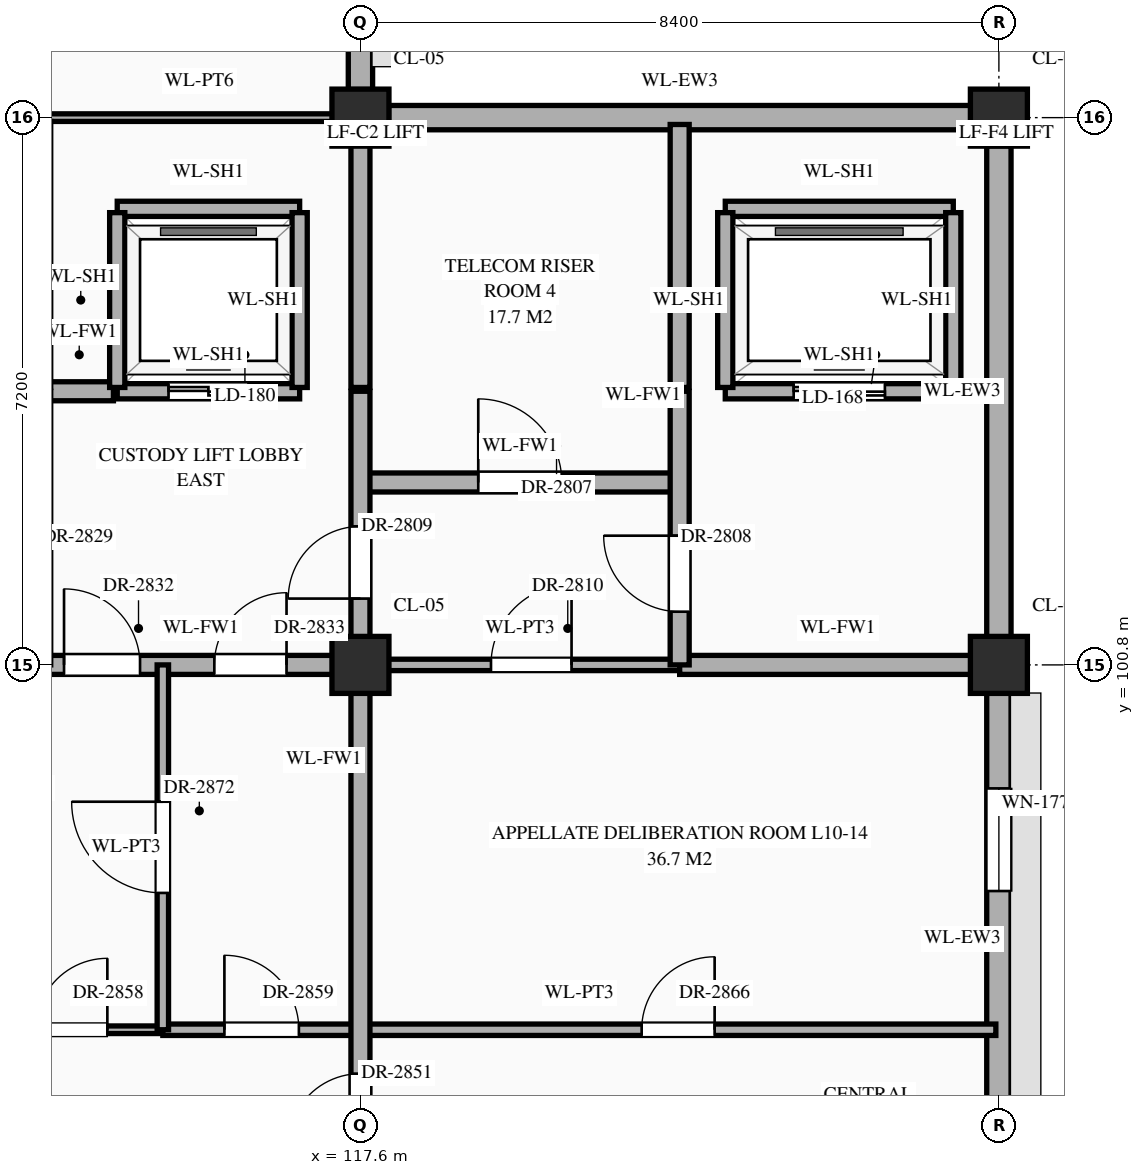
"""IFC4 building model, lengths in metres.
Left out: names, types, materials, properties, quantities, classifications, styles, units other than length and angle.
Written with IfcOpenShell. Run it as: python <this file> out.ifc"""

import sys

from ifc_helpers import new_model, si_unit, direction, frame, frame_2d, origin, origin_2d, place, context, subcontext, project, spatial, rectangle, extrude, element, fill, save


model = new_model("IFC4")
c1 = context("Model", 3, precision=1e-05, world=origin(), true_north=direction((0.0, 1.0)))
c2 = subcontext(c1, "Body", "Model", "MODEL_VIEW")
j1 = project(units=[si_unit("LENGTHUNIT", "METRE"), si_unit("PLANEANGLEUNIT", "RADIAN")], contexts=[c1])
p1 = place(None, origin())
s1 = spatial("IfcSite", under=j1, at=p1, CompositionType="ELEMENT")
p2 = place(p1, origin())
s2 = spatial("IfcBuilding", under=s1, at=p2, CompositionType="ELEMENT")
p3 = place(p2, frame((0.0, 0.0, 43.5)))
s3 = spatial("IfcBuildingStorey", under=s2, at=p3, CompositionType="ELEMENT", Elevation=43.5)
for number, where, z_axis, x_axis in (
    (1, (117.6, 100.8, 0.0), (0.0, 0.0, 1.0), (1.0, 0.0, 0.0)),
    (2, (117.6, 108.0, 0.0), (0.0, 0.0, 1.0), (1.0, 0.0, 0.0)),
    (3, (126.0, 100.8, 0.0), (0.0, 0.0, 1.0), (1.0, 0.0, 0.0)),
    (4, (126.0, 108.0, 0.0), (0.0, 0.0, 1.0), (1.0, 0.0, 0.0)),
):
    element("IfcColumn", number, at=place(p3, frame(where, z_axis=z_axis, x_axis=x_axis)), inside=s3, PredefinedType="COLUMN", context=c2, shape_type="SweptSolid", body=[
        extrude(rectangle(XDim=0.75, YDim=0.75, at=origin_2d()), origin(), (0.0, 0.0, 1.0), 4.2),
    ])
p4 = place(p3, frame((117.6, 108.37, 0.0), z_axis=(0.0, 0.0, 1.0), x_axis=(0.0, 1.0, 0.0)))
e5 = element("IfcWall", 5, at=p4, inside=s3, PredefinedType="STANDARD", context=c2, shape_type="SweptSolid", body=[
    extrude(rectangle(XDim=6.46, YDim=0.32, at=frame_2d((3.23, 0.0))), origin(), (0.0, 0.0, 1.0), 3.35),
])
p5 = place(p4, frame((3.855, 0.0, 0.85)))
e6 = element("IfcOpeningElement", 6, at=p5, cuts=e5, PredefinedType="OPENING", context=c2, shape_type="SweptSolid", body=[
    extrude(rectangle(XDim=1.35, YDim=1.38, at=frame_2d((0.675, 0.69))), frame((0.0, 0.172, 0.0), z_axis=(0.0, -1.0, 0.0), x_axis=(1.0, 0.0, 0.0)), (0.0, 0.0, 1.0), 0.344),
])
p6 = place(p3, frame((126.0, 93.97, 0.0), z_axis=(0.0, 0.0, 1.0), x_axis=(0.0, 1.0, 0.0)))
e7 = element("IfcWall", 7, at=p6, inside=s3, PredefinedType="STANDARD", context=c2, shape_type="SweptSolid", body=[
    extrude(rectangle(XDim=6.46, YDim=0.32, at=frame_2d((3.23, 0.0))), origin(), (0.0, 0.0, 1.0), 3.35),
])
p7 = place(p6, frame((3.855, 0.0, 0.85)))
e8 = element("IfcOpeningElement", 8, at=p7, cuts=e7, PredefinedType="OPENING", context=c2, shape_type="SweptSolid", body=[
    extrude(rectangle(XDim=1.35, YDim=1.2, at=frame_2d((0.675, 0.6))), frame((0.0, 0.172, 0.0), z_axis=(0.0, -1.0, 0.0), x_axis=(1.0, 0.0, 0.0)), (0.0, 0.0, 1.0), 0.344),
])
p8 = place(p3, frame((117.97, 108.0, 0.0), z_axis=(0.0, 0.0, 1.0), x_axis=(1.0, 0.0, 0.0)))
e9 = element("IfcWall", 9, at=p8, inside=s3, PredefinedType="STANDARD", context=c2, shape_type="SweptSolid", body=[
    extrude(rectangle(XDim=7.66, YDim=0.32, at=frame_2d((3.83, 0.0))), origin(), (0.0, 0.0, 1.0), 3.35),
])
p9 = place(p3, frame((126.0, 101.17, 0.0), z_axis=(0.0, 0.0, 1.0), x_axis=(0.0, 1.0, 0.0)))
e10 = element("IfcWall", 10, at=p9, inside=s3, PredefinedType="STANDARD", context=c2, shape_type="SweptSolid", body=[
    extrude(rectangle(XDim=6.46, YDim=0.32, at=frame_2d((3.23, 0.0))), origin(), (0.0, 0.0, 1.0), 3.35),
])
p10 = place(p3, frame((109.2, 96.0, 0.0), z_axis=(0.0, 0.0, 1.0), x_axis=(1.0, 0.0, 0.0)))
e11 = element("IfcWall", 11, at=p10, inside=s3, PredefinedType="STANDARD", context=c2, shape_type="SweptSolid", body=[
    extrude(rectangle(XDim=5.8, YDim=0.1, at=frame_2d((2.9, 0.0))), origin(), (0.0, 0.0, 1.0), 3.95),
])
p11 = place(p10, frame((1.06, 0.0, 0.0)))
e12 = element("IfcOpeningElement", 12, at=p11, cuts=e11, PredefinedType="OPENING", context=c2, shape_type="SweptSolid", body=[
    extrude(rectangle(XDim=1.28, YDim=2.35, at=frame_2d((0.64, 1.175))), frame((0.0, 0.062, 0.0), z_axis=(0.0, -1.0, 0.0), x_axis=(1.0, 0.0, 0.0)), (0.0, 0.0, 1.0), 0.124),
])
p12 = place(p10, frame((4.13, 0.0, 0.0)))
e13 = element("IfcOpeningElement", 13, at=p12, cuts=e11, PredefinedType="OPENING", context=c2, shape_type="SweptSolid", body=[
    extrude(rectangle(XDim=0.94, YDim=2.3, at=frame_2d((0.47, 1.15))), frame((0.0, 0.062, 0.0), z_axis=(0.0, -1.0, 0.0), x_axis=(1.0, 0.0, 0.0)), (0.0, 0.0, 1.0), 0.124),
])
p13 = place(p3, frame((115.0, 96.0, 0.0), z_axis=(0.0, 0.0, 1.0), x_axis=(1.0, 0.0, 0.0)))
e14 = element("IfcWall", 14, at=p13, inside=s3, PredefinedType="STANDARD", context=c2, shape_type="SweptSolid", body=[
    extrude(rectangle(XDim=10.96, YDim=0.15, at=frame_2d((5.48, 0.0))), origin(), (0.0, 0.0, 1.0), 4.0),
])
p14 = place(p13, frame((0.81, 0.0, 0.0)))
e15 = element("IfcOpeningElement", 15, at=p14, cuts=e14, PredefinedType="OPENING", context=c2, shape_type="SweptSolid", body=[
    extrude(rectangle(XDim=0.98, YDim=2.35, at=frame_2d((0.49, 1.175))), frame((0.0, 0.087, 0.0), z_axis=(0.0, -1.0, 0.0), x_axis=(1.0, 0.0, 0.0)), (0.0, 0.0, 1.0), 0.174),
])
p15 = place(p13, frame((6.3, 0.0, 0.0)))
e16 = element("IfcOpeningElement", 16, at=p15, cuts=e14, PredefinedType="OPENING", context=c2, shape_type="SweptSolid", body=[
    extrude(rectangle(XDim=0.96, YDim=2.2, at=frame_2d((0.48, 1.1))), frame((0.0, 0.087, 0.0), z_axis=(0.0, -1.0, 0.0), x_axis=(1.0, 0.0, 0.0)), (0.0, 0.0, 1.0), 0.174),
])
p16 = place(p3, frame((113.4, 100.8, 0.0), z_axis=(0.0, 0.0, 1.0), x_axis=(1.0, 0.0, 0.0)))
e17 = element("IfcWall", 17, at=p16, inside=s3, PredefinedType="STANDARD", context=c2, shape_type="SweptSolid", body=[
    extrude(rectangle(XDim=4.2, YDim=0.25, at=frame_2d((2.1, 0.0))), origin(), (0.0, 0.0, 1.0), 3.1),
])
p17 = place(p16, frame((0.3, 0.0, 0.0)))
e18 = element("IfcOpeningElement", 18, at=p17, cuts=e17, PredefinedType="OPENING", context=c2, shape_type="SweptSolid", body=[
    extrude(rectangle(XDim=1.0, YDim=2.2, at=frame_2d((0.5, 1.1))), frame((0.0, 0.137, 0.0), z_axis=(0.0, -1.0, 0.0), x_axis=(1.0, 0.0, 0.0)), (0.0, 0.0, 1.0), 0.274),
])
p18 = place(p16, frame((2.278, 0.0, 0.0)))
e19 = element("IfcOpeningElement", 19, at=p18, cuts=e17, PredefinedType="OPENING", context=c2, shape_type="SweptSolid", body=[
    extrude(rectangle(XDim=0.95, YDim=2.15, at=frame_2d((0.475, 1.075))), frame((0.0, 0.137, 0.0), z_axis=(0.0, -1.0, 0.0), x_axis=(1.0, 0.0, 0.0)), (0.0, 0.0, 1.0), 0.274),
])
p19 = place(p3, frame((117.6, 100.8, 0.0), z_axis=(0.0, 0.0, 1.0), x_axis=(1.0, 0.0, 0.0)))
e20 = element("IfcWall", 20, at=p19, inside=s3, PredefinedType="STANDARD", context=c2, shape_type="SweptSolid", body=[
    extrude(rectangle(XDim=4.2, YDim=0.15, at=frame_2d((2.1, 0.0))), origin(), (0.0, 0.0, 1.0), 3.15),
])
p20 = place(p19, frame((1.718, 0.0, 0.0)))
e21 = element("IfcOpeningElement", 21, at=p20, cuts=e20, PredefinedType="OPENING", context=c2, shape_type="SweptSolid", body=[
    extrude(rectangle(XDim=1.06, YDim=2.4, at=frame_2d((0.53, 1.2))), frame((0.0, 0.087, 0.0), z_axis=(0.0, -1.0, 0.0), x_axis=(1.0, 0.0, 0.0)), (0.0, 0.0, 1.0), 0.174),
])
p21 = place(p3, frame((121.8, 100.8, 0.0), z_axis=(0.0, 0.0, 1.0), x_axis=(1.0, 0.0, 0.0)))
e22 = element("IfcWall", 22, at=p21, inside=s3, PredefinedType="STANDARD", context=c2, shape_type="SweptSolid", body=[
    extrude(rectangle(XDim=4.16, YDim=0.25, at=frame_2d((2.08, 0.0))), origin(), (0.0, 0.0, 1.0), 3.15),
])
p22 = place(p3, frame((117.6, 103.2, 0.0), z_axis=(0.0, 0.0, 1.0), x_axis=(1.0, 0.0, 0.0)))
e23 = element("IfcWall", 23, at=p22, inside=s3, PredefinedType="STANDARD", context=c2, shape_type="SweptSolid", body=[
    extrude(rectangle(XDim=4.2, YDim=0.25, at=frame_2d((2.1, 0.0))), origin(), (0.0, 0.0, 1.0), 4.0),
])
p23 = place(p22, frame((1.55, 0.0, 0.0)))
e24 = element("IfcOpeningElement", 24, at=p23, cuts=e23, PredefinedType="OPENING", context=c2, shape_type="SweptSolid", body=[
    extrude(rectangle(XDim=1.1, YDim=2.2, at=frame_2d((0.55, 1.1))), frame((0.0, 0.137, 0.0), z_axis=(0.0, -1.0, 0.0), x_axis=(1.0, 0.0, 0.0)), (0.0, 0.0, 1.0), 0.274),
])
p24 = place(p3, frame((113.45, 104.4, 0.0), z_axis=(0.0, 0.0, 1.0), x_axis=(1.0, 0.0, 0.0)))
e25 = element("IfcWall", 25, at=p24, inside=s3, PredefinedType="STANDARD", context=c2, shape_type="SweptSolid", body=[
    extrude(rectangle(XDim=0.9, YDim=0.25, at=frame_2d((0.45, 0.0))), origin(), (0.0, 0.0, 1.0), 3.95),
])
p25 = place(p3, frame((114.4, 104.4, 0.0), z_axis=(0.0, 0.0, 1.0), x_axis=(1.0, 0.0, 0.0)))
e26 = element("IfcWall", 26, at=p25, inside=s3, PredefinedType="STANDARD", context=c2, shape_type="SweptSolid", body=[
    extrude(rectangle(XDim=2.4, YDim=0.2, at=frame_2d((1.2, 0.0))), origin(), (0.0, 0.0, 1.0), 3.95),
])
p26 = place(p25, frame((0.675, 0.0, 0.0)))
e27 = element("IfcOpeningElement", 27, at=p26, cuts=e26, PredefinedType="OPENING", context=c2, shape_type="SweptSolid", body=[
    extrude(rectangle(XDim=1.05, YDim=2.15, at=frame_2d((0.525, 1.075))), frame((0.0, 0.112, 0.0), z_axis=(0.0, -1.0, 0.0), x_axis=(1.0, 0.0, 0.0)), (0.0, 0.0, 1.0), 0.224),
])
p27 = place(p3, frame((122.4, 104.4, 0.0), z_axis=(0.0, 0.0, 1.0), x_axis=(1.0, 0.0, 0.0)))
e28 = element("IfcWall", 28, at=p27, inside=s3, PredefinedType="STANDARD", context=c2, shape_type="SweptSolid", body=[
    extrude(rectangle(XDim=3.0, YDim=0.2, at=frame_2d((1.5, 0.0))), origin(), (0.0, 0.0, 1.0), 4.0),
])
p28 = place(p27, frame((0.9, 0.0, 0.0)))
e29 = element("IfcOpeningElement", 29, at=p28, cuts=e28, PredefinedType="OPENING", context=c2, shape_type="SweptSolid", body=[
    extrude(rectangle(XDim=1.2, YDim=2.15, at=frame_2d((0.6, 1.075))), frame((0.0, 0.112, 0.0), z_axis=(0.0, -1.0, 0.0), x_axis=(1.0, 0.0, 0.0)), (0.0, 0.0, 1.0), 0.224),
])
p29 = place(p3, frame((114.4, 106.8, 0.0), z_axis=(0.0, 0.0, 1.0), x_axis=(1.0, 0.0, 0.0)))
e30 = element("IfcWall", 30, at=p29, inside=s3, PredefinedType="STANDARD", context=c2, shape_type="SweptSolid", body=[
    extrude(rectangle(XDim=2.4, YDim=0.2, at=frame_2d((1.2, 0.0))), origin(), (0.0, 0.0, 1.0), 3.95),
])
p30 = place(p3, frame((122.4, 106.8, 0.0), z_axis=(0.0, 0.0, 1.0), x_axis=(1.0, 0.0, 0.0)))
e31 = element("IfcWall", 31, at=p30, inside=s3, PredefinedType="STANDARD", context=c2, shape_type="SweptSolid", body=[
    extrude(rectangle(XDim=3.0, YDim=0.2, at=frame_2d((1.5, 0.0))), origin(), (0.0, 0.0, 1.0), 4.0),
])
p31 = place(p3, frame((113.45, 108.0, 0.0), z_axis=(0.0, 0.0, 1.0), x_axis=(1.0, 0.0, 0.0)))
e32 = element("IfcWall", 32, at=p31, inside=s3, PredefinedType="STANDARD", context=c2, shape_type="SweptSolid", body=[
    extrude(rectangle(XDim=4.06, YDim=0.1, at=frame_2d((2.03, 0.0))), origin(), (0.0, 0.0, 1.0), 3.1),
])
p32 = place(p3, frame((114.4, 104.45, 0.0), z_axis=(0.0, 0.0, 1.0), x_axis=(0.0, 1.0, 0.0)))
e33 = element("IfcWall", 33, at=p32, inside=s3, PredefinedType="STANDARD", context=c2, shape_type="SweptSolid", body=[
    extrude(rectangle(XDim=2.3, YDim=0.2, at=frame_2d((1.15, 0.0))), origin(), (0.0, 0.0, 1.0), 3.95),
])
p33 = place(p3, frame((115.0, 96.0, 0.0), z_axis=(0.0, 0.0, 1.0), x_axis=(0.0, 1.0, 0.0)))
e34 = element("IfcWall", 34, at=p33, inside=s3, PredefinedType="STANDARD", context=c2, shape_type="SweptSolid", body=[
    extrude(rectangle(XDim=4.8, YDim=0.15, at=frame_2d((2.4, 0.0))), origin(), (0.0, 0.0, 1.0), 3.95),
])
p34 = place(p33, frame((1.8, 0.0, 0.0)))
e35 = element("IfcOpeningElement", 35, at=p34, cuts=e34, PredefinedType="OPENING", context=c2, shape_type="SweptSolid", body=[
    extrude(rectangle(XDim=1.2, YDim=2.35, at=frame_2d((0.6, 1.175))), frame((0.0, 0.087, 0.0), z_axis=(0.0, -1.0, 0.0), x_axis=(1.0, 0.0, 0.0)), (0.0, 0.0, 1.0), 0.174),
])
p35 = place(p3, frame((116.8, 104.45, 0.0), z_axis=(0.0, 0.0, 1.0), x_axis=(0.0, 1.0, 0.0)))
e36 = element("IfcWall", 36, at=p35, inside=s3, PredefinedType="STANDARD", context=c2, shape_type="SweptSolid", body=[
    extrude(rectangle(XDim=2.3, YDim=0.2, at=frame_2d((1.15, 0.0))), origin(), (0.0, 0.0, 1.0), 3.95),
])
p36 = place(p3, frame((117.6, 91.2, 0.0), z_axis=(0.0, 0.0, 1.0), x_axis=(0.0, 1.0, 0.0)))
e37 = element("IfcWall", 37, at=p36, inside=s3, PredefinedType="STANDARD", context=c2, shape_type="SweptSolid", body=[
    extrude(rectangle(XDim=13.2, YDim=0.25, at=frame_2d((6.6, 0.0))), origin(), (0.0, 0.0, 1.0), 3.2),
])
p37 = place(p36, frame((0.502, 0.0, 0.0)))
e38 = element("IfcOpeningElement", 38, at=p37, cuts=e37, PredefinedType="OPENING", context=c2, shape_type="SweptSolid", body=[
    extrude(rectangle(XDim=1.1, YDim=2.2, at=frame_2d((0.55, 1.1))), frame((0.0, 0.137, 0.0), z_axis=(0.0, -1.0, 0.0), x_axis=(1.0, 0.0, 0.0)), (0.0, 0.0, 1.0), 0.274),
])
p38 = place(p36, frame((10.472, 0.0, 0.0)))
e39 = element("IfcOpeningElement", 39, at=p38, cuts=e37, PredefinedType="OPENING", context=c2, shape_type="SweptSolid", body=[
    extrude(rectangle(XDim=0.95, YDim=2.15, at=frame_2d((0.475, 1.075))), frame((0.0, 0.137, 0.0), z_axis=(0.0, -1.0, 0.0), x_axis=(1.0, 0.0, 0.0)), (0.0, 0.0, 1.0), 0.274),
])
p39 = place(p36, frame((3.272, 0.0, 0.0)))
e40 = element("IfcOpeningElement", 40, at=p39, cuts=e37, PredefinedType="OPENING", context=c2, shape_type="SweptSolid", body=[
    extrude(rectangle(XDim=0.95, YDim=2.15, at=frame_2d((0.475, 1.075))), frame((0.0, 0.137, 0.0), z_axis=(0.0, -1.0, 0.0), x_axis=(1.0, 0.0, 0.0)), (0.0, 0.0, 1.0), 0.274),
])
p40 = place(p3, frame((117.6, 104.45, 0.0), z_axis=(0.0, 0.0, 1.0), x_axis=(0.0, 1.0, 0.0)))
e41 = element("IfcWall", 41, at=p40, inside=s3, PredefinedType="STANDARD", context=c2, shape_type="SweptSolid", body=[
    extrude(rectangle(XDim=3.46, YDim=0.25, at=frame_2d((1.73, 0.0))), origin(), (0.0, 0.0, 1.0), 3.2),
])
p41 = place(p3, frame((121.8, 100.8, 0.0), z_axis=(0.0, 0.0, 1.0), x_axis=(0.0, 1.0, 0.0)))
e42 = element("IfcWall", 42, at=p41, inside=s3, PredefinedType="STANDARD", context=c2, shape_type="SweptSolid", body=[
    extrude(rectangle(XDim=3.6, YDim=0.25, at=frame_2d((1.8, 0.0))), origin(), (0.0, 0.0, 1.0), 3.65),
])
p42 = place(p41, frame((0.7, 0.0, 0.0)))
e43 = element("IfcOpeningElement", 43, at=p42, cuts=e42, PredefinedType="OPENING", context=c2, shape_type="SweptSolid", body=[
    extrude(rectangle(XDim=1.0, YDim=2.2, at=frame_2d((0.5, 1.1))), frame((0.0, 0.137, 0.0), z_axis=(0.0, -1.0, 0.0), x_axis=(1.0, 0.0, 0.0)), (0.0, 0.0, 1.0), 0.274),
])
p43 = place(p3, frame((121.8, 104.45, 0.0), z_axis=(0.0, 0.0, 1.0), x_axis=(0.0, 1.0, 0.0)))
e44 = element("IfcWall", 44, at=p43, inside=s3, PredefinedType="STANDARD", context=c2, shape_type="SweptSolid", body=[
    extrude(rectangle(XDim=3.46, YDim=0.25, at=frame_2d((1.73, 0.0))), origin(), (0.0, 0.0, 1.0), 3.65),
])
for number, where, z_axis, x_axis in (
    (45, (122.4, 104.45, 0.0), (0.0, 0.0, 1.0), (0.0, 1.0, 0.0)),
    (46, (125.4, 104.45, 0.0), (0.0, 0.0, 1.0), (0.0, 1.0, 0.0)),
):
    element("IfcWall", number, at=place(p3, frame(where, z_axis=z_axis, x_axis=x_axis)), inside=s3, PredefinedType="STANDARD", context=c2, shape_type="SweptSolid", body=[
        extrude(rectangle(XDim=2.3, YDim=0.2, at=frame_2d((1.15, 0.0))), origin(), (0.0, 0.0, 1.0), 4.0),
    ])
p44 = place(p7, origin())
e47 = element("IfcWindow", 47, at=p44, inside=s3, PartitioningType="SINGLE_PANEL", PredefinedType="WINDOW", context=c2, shape_type="SweptSolid", body=[
    extrude(rectangle(XDim=1.35, YDim=1.2, at=frame_2d((0.675, 0.6))), frame((0.0, 0.03, 0.0), z_axis=(0.0, -1.0, 0.0), x_axis=(1.0, 0.0, 0.0)), (0.0, 0.0, 1.0), 0.06),
])
fill(e8, e47)
p45 = place(p28, origin())
e48 = element("IfcDoor", 48, at=p45, inside=s3, OperationType="DOUBLE_DOOR_SLIDING", PredefinedType="DOOR", context=c2, shape_type="SweptSolid", body=[
    extrude(rectangle(XDim=1.2, YDim=2.15, at=frame_2d((0.6, 1.075))), frame((0.0, 0.025, 0.0), z_axis=(0.0, -1.0, 0.0), x_axis=(1.0, 0.0, 0.0)), (0.0, 0.0, 1.0), 0.05),
])
fill(e29, e48)
p46 = place(p26, origin())
e49 = element("IfcDoor", 49, at=p46, inside=s3, OperationType="DOUBLE_DOOR_SLIDING", PredefinedType="DOOR", context=c2, shape_type="SweptSolid", body=[
    extrude(rectangle(XDim=1.05, YDim=2.15, at=frame_2d((0.525, 1.075))), frame((0.0, 0.025, 0.0), z_axis=(0.0, -1.0, 0.0), x_axis=(1.0, 0.0, 0.0)), (0.0, 0.0, 1.0), 0.05),
])
fill(e27, e49)
p47 = place(p23, origin())
e50 = element("IfcDoor", 50, at=p47, inside=s3, OperationType="SINGLE_SWING_LEFT", PredefinedType="DOOR", context=c2, shape_type="SweptSolid", body=[
    extrude(rectangle(XDim=1.1, YDim=2.2, at=frame_2d((0.55, 1.1))), frame((0.0, 0.025, 0.0), z_axis=(0.0, -1.0, 0.0), x_axis=(1.0, 0.0, 0.0)), (0.0, 0.0, 1.0), 0.05),
])
fill(e24, e50)
p48 = place(p42, origin())
e51 = element("IfcDoor", 51, at=p48, inside=s3, OperationType="SINGLE_SWING_RIGHT", PredefinedType="DOOR", context=c2, shape_type="SweptSolid", body=[
    extrude(rectangle(XDim=1.0, YDim=2.2, at=frame_2d((0.5, 1.1))), frame((0.0, 0.025, 0.0), z_axis=(0.0, -1.0, 0.0), x_axis=(1.0, 0.0, 0.0)), (0.0, 0.0, 1.0), 0.05),
])
fill(e43, e51)
p49 = place(p38, origin())
e52 = element("IfcDoor", 52, at=p49, inside=s3, OperationType="SINGLE_SWING_LEFT", PredefinedType="DOOR", context=c2, shape_type="SweptSolid", body=[
    extrude(rectangle(XDim=0.95, YDim=2.15, at=frame_2d((0.475, 1.075))), frame((0.0, 0.025, 0.0), z_axis=(0.0, -1.0, 0.0), x_axis=(1.0, 0.0, 0.0)), (0.0, 0.0, 1.0), 0.05),
])
fill(e39, e52)
p50 = place(p20, origin())
e53 = element("IfcDoor", 53, at=p50, inside=s3, OperationType="SINGLE_SWING_RIGHT", PredefinedType="DOOR", context=c2, shape_type="SweptSolid", body=[
    extrude(rectangle(XDim=1.06, YDim=2.4, at=frame_2d((0.53, 1.2))), frame((0.0, 0.025, 0.0), z_axis=(0.0, -1.0, 0.0), x_axis=(1.0, 0.0, 0.0)), (0.0, 0.0, 1.0), 0.05),
])
fill(e21, e53)
p51 = place(p17, origin())
e54 = element("IfcDoor", 54, at=p51, inside=s3, OperationType="SINGLE_SWING_LEFT", PredefinedType="DOOR", context=c2, shape_type="SweptSolid", body=[
    extrude(rectangle(XDim=1.0, YDim=2.2, at=frame_2d((0.5, 1.1))), frame((0.0, 0.025, 0.0), z_axis=(0.0, -1.0, 0.0), x_axis=(1.0, 0.0, 0.0)), (0.0, 0.0, 1.0), 0.05),
])
fill(e18, e54)
p52 = place(p18, origin())
e55 = element("IfcDoor", 55, at=p52, inside=s3, OperationType="SINGLE_SWING_RIGHT", PredefinedType="DOOR", context=c2, shape_type="SweptSolid", body=[
    extrude(rectangle(XDim=0.95, YDim=2.15, at=frame_2d((0.475, 1.075))), frame((0.0, 0.025, 0.0), z_axis=(0.0, -1.0, 0.0), x_axis=(1.0, 0.0, 0.0)), (0.0, 0.0, 1.0), 0.05),
])
fill(e19, e55)
p53 = place(p39, origin())
e56 = element("IfcDoor", 56, at=p53, inside=s3, OperationType="SINGLE_SWING_LEFT", PredefinedType="DOOR", context=c2, shape_type="SweptSolid", body=[
    extrude(rectangle(XDim=0.95, YDim=2.15, at=frame_2d((0.475, 1.075))), frame((0.0, 0.025, 0.0), z_axis=(0.0, -1.0, 0.0), x_axis=(1.0, 0.0, 0.0)), (0.0, 0.0, 1.0), 0.05),
])
fill(e40, e56)
p54 = place(p12, origin())
e57 = element("IfcDoor", 57, at=p54, inside=s3, OperationType="SINGLE_SWING_RIGHT", PredefinedType="DOOR", context=c2, shape_type="SweptSolid", body=[
    extrude(rectangle(XDim=0.94, YDim=2.3, at=frame_2d((0.47, 1.15))), frame((0.0, 0.025, 0.0), z_axis=(0.0, -1.0, 0.0), x_axis=(1.0, 0.0, 0.0)), (0.0, 0.0, 1.0), 0.05),
])
fill(e13, e57)
p55 = place(p14, origin())
e58 = element("IfcDoor", 58, at=p55, inside=s3, OperationType="SINGLE_SWING_LEFT", PredefinedType="DOOR", context=c2, shape_type="SweptSolid", body=[
    extrude(rectangle(XDim=0.98, YDim=2.35, at=frame_2d((0.49, 1.175))), frame((0.0, 0.025, 0.0), z_axis=(0.0, -1.0, 0.0), x_axis=(1.0, 0.0, 0.0)), (0.0, 0.0, 1.0), 0.05),
])
fill(e15, e58)
p56 = place(p15, origin())
e59 = element("IfcDoor", 59, at=p56, inside=s3, OperationType="SINGLE_SWING_RIGHT", PredefinedType="DOOR", context=c2, shape_type="SweptSolid", body=[
    extrude(rectangle(XDim=0.96, YDim=2.2, at=frame_2d((0.48, 1.1))), frame((0.0, 0.025, 0.0), z_axis=(0.0, -1.0, 0.0), x_axis=(1.0, 0.0, 0.0)), (0.0, 0.0, 1.0), 0.05),
])
fill(e16, e59)
p57 = place(p34, origin())
e60 = element("IfcDoor", 60, at=p57, inside=s3, OperationType="SINGLE_SWING_RIGHT", PredefinedType="DOOR", context=c2, shape_type="SweptSolid", body=[
    extrude(rectangle(XDim=1.2, YDim=2.35, at=frame_2d((0.6, 1.175))), frame((0.0, 0.025, 0.0), z_axis=(0.0, -1.0, 0.0), x_axis=(1.0, 0.0, 0.0)), (0.0, 0.0, 1.0), 0.05),
])
fill(e35, e60)
save(model, sys.argv[1])
